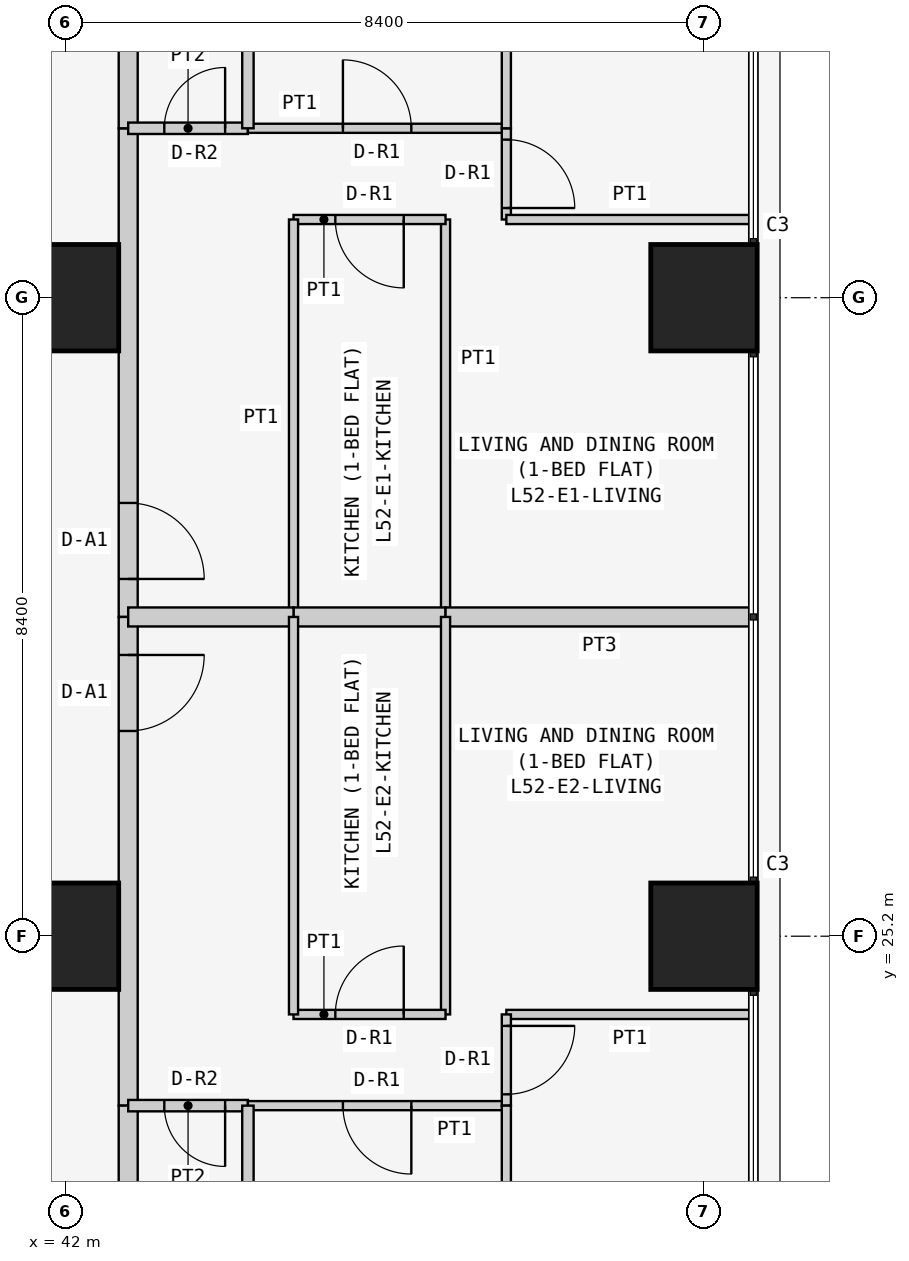
"""IFC4 building model, lengths in metres.
Left out: names, types, materials, properties, quantities, classifications, styles, units other than length and angle.
Written with IfcOpenShell. Run it as: python <this file> out.ifc"""

import sys

from ifc_helpers import new_model, si_unit, direction, frame, frame_2d, origin, origin_2d, place, context, subcontext, project, spatial, rectangle, extrude, element, fill, save


model = new_model("IFC4")
c1 = context("Model", 3, precision=1e-05, world=origin(), true_north=direction((0.0, 1.0)))
c2 = subcontext(c1, "Body", "Model", "MODEL_VIEW")
j1 = project(units=[si_unit("LENGTHUNIT", "METRE"), si_unit("PLANEANGLEUNIT", "RADIAN")], contexts=[c1])
p1 = place(None, origin())
s1 = spatial("IfcSite", under=j1, at=p1, CompositionType="ELEMENT")
p2 = place(p1, origin())
s2 = spatial("IfcBuilding", under=s1, at=p2, CompositionType="ELEMENT")
p3 = place(p2, frame((0.0, 0.0, 201.3)))
s3 = spatial("IfcBuildingStorey", under=s2, at=p3, CompositionType="ELEMENT", Elevation=201.3)
for number, where, z_axis, x_axis in (
    (1, (42.0, 25.2, 0.0), (0.0, 0.0, 1.0), (1.0, 0.0, 0.0)),
    (2, (42.0, 33.6, 0.0), (0.0, 0.0, 1.0), (1.0, 0.0, 0.0)),
    (3, (50.4, 25.2, 0.0), (0.0, 0.0, 1.0), (1.0, 0.0, 0.0)),
    (4, (50.4, 33.6, 0.0), (0.0, 0.0, 1.0), (1.0, 0.0, 0.0)),
):
    element("IfcColumn", number, at=place(p3, frame(where, z_axis=z_axis, x_axis=x_axis)), inside=s3, PredefinedType="COLUMN", context=c2, shape_type="SweptSolid", body=[
        extrude(rectangle(XDim=1.4, YDim=1.4, at=origin_2d()), origin(), (0.0, 0.0, 1.0), 3.6),
    ])
p4 = place(p3, frame((42.825, 35.829, 0.0), z_axis=(0.0, 0.0, 1.0), x_axis=(0.0, -1.0, 0.0)))
e5 = element("IfcWall", 5, at=p4, inside=s3, PredefinedType="PARTITIONING", context=c2, shape_type="SweptSolid", body=[
    extrude(rectangle(XDim=6.429, YDim=0.25, at=frame_2d((3.215, 0.0))), origin(), (0.0, 0.0, 1.0), 3.45),
])
p5 = place(p4, frame((4.929, 0.0, 0.0)))
e6 = element("IfcOpeningElement", 6, at=p5, cuts=e5, PredefinedType="OPENING", context=c2, shape_type="SweptSolid", body=[
    extrude(rectangle(XDim=1.0, YDim=2.1, at=frame_2d((0.5, 1.05))), frame((0.0, 0.135, 0.0), z_axis=(0.0, -1.0, 0.0), x_axis=(1.0, 0.0, 0.0)), (0.0, 0.0, 1.0), 0.27),
])
p6 = place(p3, frame((42.825, 42.7, 0.0), z_axis=(0.0, 0.0, 1.0), x_axis=(0.0, -1.0, 0.0)))
e7 = element("IfcWall", 7, at=p6, inside=s3, PredefinedType="PARTITIONING", context=c2, shape_type="SweptSolid", body=[
    extrude(rectangle(XDim=6.871, YDim=0.25, at=frame_2d((3.436, 0.0))), origin(), (0.0, 0.0, 1.0), 3.45),
])
p7 = place(p3, frame((42.825, 29.4, 0.0), z_axis=(0.0, 0.0, 1.0), x_axis=(0.0, -1.0, 0.0)))
e8 = element("IfcWall", 8, at=p7, inside=s3, PredefinedType="PARTITIONING", context=c2, shape_type="SweptSolid", body=[
    extrude(rectangle(XDim=6.429, YDim=0.25, at=frame_2d((3.214, 0.0))), origin(), (0.0, 0.0, 1.0), 3.45),
])
p8 = place(p7, frame((0.5, 0.0, 0.0)))
e9 = element("IfcOpeningElement", 9, at=p8, cuts=e8, PredefinedType="OPENING", context=c2, shape_type="SweptSolid", body=[
    extrude(rectangle(XDim=1.0, YDim=2.1, at=frame_2d((0.5, 1.05))), frame((0.0, 0.135, 0.0), z_axis=(0.0, -1.0, 0.0), x_axis=(1.0, 0.0, 0.0)), (0.0, 0.0, 1.0), 0.27),
])
p9 = place(p3, frame((42.825, 22.971, 0.0), z_axis=(0.0, 0.0, 1.0), x_axis=(0.0, -1.0, 0.0)))
e10 = element("IfcWall", 10, at=p9, inside=s3, PredefinedType="PARTITIONING", context=c2, shape_type="SweptSolid", body=[
    extrude(rectangle(XDim=6.871, YDim=0.25, at=frame_2d((3.436, 0.0))), origin(), (0.0, 0.0, 1.0), 3.45),
])
p10 = place(p3, frame((47.0, 29.4, 0.0), z_axis=(0.0, 0.0, 1.0), x_axis=(0.0, 1.0, 0.0)))
e11 = element("IfcWall", 11, at=p10, inside=s3, PredefinedType="PARTITIONING", context=c2, shape_type="SweptSolid", body=[
    extrude(rectangle(XDim=5.229, YDim=0.12, at=frame_2d((2.615, 0.0))), origin(), (0.0, 0.0, 1.0), 3.45),
])
p11 = place(p3, frame((47.0, 34.629, 0.0), z_axis=(0.0, 0.0, 1.0), x_axis=(-1.0, 0.0, 0.0)))
e12 = element("IfcWall", 12, at=p11, inside=s3, PredefinedType="PARTITIONING", context=c2, shape_type="SweptSolid", body=[
    extrude(rectangle(XDim=2.0, YDim=0.12, at=frame_2d((1.0, 0.0))), origin(), (0.0, 0.0, 1.0), 3.45),
])
p12 = place(p11, frame((0.55, 0.0, 0.0)))
e13 = element("IfcOpeningElement", 13, at=p12, cuts=e12, PredefinedType="OPENING", context=c2, shape_type="SweptSolid", body=[
    extrude(rectangle(XDim=0.9, YDim=2.1, at=frame_2d((0.45, 1.05))), frame((0.0, 0.07, 0.0), z_axis=(0.0, -1.0, 0.0), x_axis=(1.0, 0.0, 0.0)), (0.0, 0.0, 1.0), 0.14),
])
p13 = place(p3, frame((45.0, 34.629, 0.0), z_axis=(0.0, 0.0, 1.0), x_axis=(0.0, -1.0, 0.0)))
e14 = element("IfcWall", 14, at=p13, inside=s3, PredefinedType="PARTITIONING", context=c2, shape_type="SweptSolid", body=[
    extrude(rectangle(XDim=5.229, YDim=0.12, at=frame_2d((2.615, 0.0))), origin(), (0.0, 0.0, 1.0), 3.45),
])
p14 = place(p3, frame((45.0, 29.4, 0.0), z_axis=(0.0, 0.0, 1.0), x_axis=(1.0, 0.0, 0.0)))
e15 = element("IfcWall", 15, at=p14, inside=s3, PredefinedType="PARTITIONING", context=c2, shape_type="SweptSolid", body=[
    extrude(rectangle(XDim=2.0, YDim=0.25, at=frame_2d((1.0, 0.0))), origin(), (0.0, 0.0, 1.0), 3.45),
])
p15 = place(p3, frame((42.825, 35.829, 0.0), z_axis=(0.0, 0.0, 1.0), x_axis=(1.0, 0.0, 0.0)))
e16 = element("IfcWall", 16, at=p15, inside=s3, PredefinedType="PARTITIONING", context=c2, shape_type="SweptSolid", body=[
    extrude(rectangle(XDim=1.575, YDim=0.15, at=frame_2d((0.788, 0.0))), origin(), (0.0, 0.0, 1.0), 3.45),
])
p16 = place(p15, frame((0.475, 0.0, 0.0)))
e17 = element("IfcOpeningElement", 17, at=p16, cuts=e16, PredefinedType="OPENING", context=c2, shape_type="SweptSolid", body=[
    extrude(rectangle(XDim=0.8, YDim=2.1, at=frame_2d((0.4, 1.05))), frame((0.0, 0.085, 0.0), z_axis=(0.0, -1.0, 0.0), x_axis=(1.0, 0.0, 0.0)), (0.0, 0.0, 1.0), 0.17),
])
p17 = place(p3, frame((44.4, 35.829, 0.0), z_axis=(0.0, 0.0, 1.0), x_axis=(1.0, 0.0, 0.0)))
e18 = element("IfcWall", 18, at=p17, inside=s3, PredefinedType="PARTITIONING", context=c2, shape_type="SweptSolid", body=[
    extrude(rectangle(XDim=3.4, YDim=0.12, at=frame_2d((1.7, 0.0))), origin(), (0.0, 0.0, 1.0), 3.45),
])
p18 = place(p17, frame((1.25, 0.0, 0.0)))
e19 = element("IfcOpeningElement", 19, at=p18, cuts=e18, PredefinedType="OPENING", context=c2, shape_type="SweptSolid", body=[
    extrude(rectangle(XDim=0.9, YDim=2.1, at=frame_2d((0.45, 1.05))), frame((0.0, 0.07, 0.0), z_axis=(0.0, -1.0, 0.0), x_axis=(1.0, 0.0, 0.0)), (0.0, 0.0, 1.0), 0.14),
])
p19 = place(p3, frame((47.8, 35.829, 0.0), z_axis=(0.0, 0.0, 1.0), x_axis=(0.0, -1.0, 0.0)))
e20 = element("IfcWall", 20, at=p19, inside=s3, PredefinedType="PARTITIONING", context=c2, shape_type="SweptSolid", body=[
    extrude(rectangle(XDim=1.2, YDim=0.12, at=frame_2d((0.6, 0.0))), origin(), (0.0, 0.0, 1.0), 3.45),
])
p20 = place(p19, frame((0.149, 0.0, 0.0)))
e21 = element("IfcOpeningElement", 21, at=p20, cuts=e20, PredefinedType="OPENING", context=c2, shape_type="SweptSolid", body=[
    extrude(rectangle(XDim=0.9, YDim=2.1, at=frame_2d((0.45, 1.05))), frame((0.0, 0.07, 0.0), z_axis=(0.0, -1.0, 0.0), x_axis=(1.0, 0.0, 0.0)), (0.0, 0.0, 1.0), 0.14),
])
p21 = place(p3, frame((47.8, 34.629, 0.0), z_axis=(0.0, 0.0, 1.0), x_axis=(1.0, 0.0, 0.0)))
e22 = element("IfcWall", 22, at=p21, inside=s3, PredefinedType="PARTITIONING", context=c2, shape_type="SweptSolid", body=[
    extrude(rectangle(XDim=3.25, YDim=0.12, at=frame_2d((1.625, 0.0))), origin(), (0.0, 0.0, 1.0), 3.45),
])
p22 = place(p3, frame((45.0, 29.4, 0.0), z_axis=(0.0, 0.0, 1.0), x_axis=(-1.0, 0.0, 0.0)))
e23 = element("IfcWall", 23, at=p22, inside=s3, PredefinedType="PARTITIONING", context=c2, shape_type="SweptSolid", body=[
    extrude(rectangle(XDim=2.175, YDim=0.25, at=frame_2d((1.087, 0.0))), origin(), (0.0, 0.0, 1.0), 3.45),
])
p23 = place(p3, frame((51.05, 29.4, 0.0), z_axis=(0.0, 0.0, 1.0), x_axis=(-1.0, 0.0, 0.0)))
e24 = element("IfcWall", 24, at=p23, inside=s3, PredefinedType="PARTITIONING", context=c2, shape_type="SweptSolid", body=[
    extrude(rectangle(XDim=4.05, YDim=0.25, at=frame_2d((2.025, 0.0))), origin(), (0.0, 0.0, 1.0), 3.45),
])
p24 = place(p3, frame((44.4, 35.829, 0.0), z_axis=(0.0, 0.0, 1.0), x_axis=(0.0, 1.0, 0.0)))
e25 = element("IfcWall", 25, at=p24, inside=s3, PredefinedType="PARTITIONING", context=c2, shape_type="SweptSolid", body=[
    extrude(rectangle(XDim=6.871, YDim=0.15, at=frame_2d((3.436, 0.0))), origin(), (0.0, 0.0, 1.0), 3.45),
])
p25 = place(p3, frame((47.8, 35.829, 0.0), z_axis=(0.0, 0.0, 1.0), x_axis=(0.0, 1.0, 0.0)))
e26 = element("IfcWall", 26, at=p25, inside=s3, PredefinedType="PARTITIONING", context=c2, shape_type="SweptSolid", body=[
    extrude(rectangle(XDim=6.871, YDim=0.12, at=frame_2d((3.436, 0.0))), origin(), (0.0, 0.0, 1.0), 3.45),
])
p26 = place(p3, frame((47.0, 29.4, 0.0), z_axis=(0.0, 0.0, 1.0), x_axis=(0.0, -1.0, 0.0)))
e27 = element("IfcWall", 27, at=p26, inside=s3, PredefinedType="PARTITIONING", context=c2, shape_type="SweptSolid", body=[
    extrude(rectangle(XDim=5.229, YDim=0.12, at=frame_2d((2.615, 0.0))), origin(), (0.0, 0.0, 1.0), 3.45),
])
p27 = place(p3, frame((47.0, 24.171, 0.0), z_axis=(0.0, 0.0, 1.0), x_axis=(-1.0, 0.0, 0.0)))
e28 = element("IfcWall", 28, at=p27, inside=s3, PredefinedType="PARTITIONING", context=c2, shape_type="SweptSolid", body=[
    extrude(rectangle(XDim=2.0, YDim=0.12, at=frame_2d((1.0, 0.0))), origin(), (0.0, 0.0, 1.0), 3.45),
])
p28 = place(p27, frame((0.55, 0.0, 0.0)))
e29 = element("IfcOpeningElement", 29, at=p28, cuts=e28, PredefinedType="OPENING", context=c2, shape_type="SweptSolid", body=[
    extrude(rectangle(XDim=0.9, YDim=2.1, at=frame_2d((0.45, 1.05))), frame((0.0, 0.07, 0.0), z_axis=(0.0, -1.0, 0.0), x_axis=(1.0, 0.0, 0.0)), (0.0, 0.0, 1.0), 0.14),
])
p29 = place(p3, frame((45.0, 24.171, 0.0), z_axis=(0.0, 0.0, 1.0), x_axis=(0.0, 1.0, 0.0)))
e30 = element("IfcWall", 30, at=p29, inside=s3, PredefinedType="PARTITIONING", context=c2, shape_type="SweptSolid", body=[
    extrude(rectangle(XDim=5.229, YDim=0.12, at=frame_2d((2.615, 0.0))), origin(), (0.0, 0.0, 1.0), 3.45),
])
p30 = place(p3, frame((44.4, 22.971, 0.0), z_axis=(0.0, 0.0, 1.0), x_axis=(-1.0, 0.0, 0.0)))
e31 = element("IfcWall", 31, at=p30, inside=s3, PredefinedType="PARTITIONING", context=c2, shape_type="SweptSolid", body=[
    extrude(rectangle(XDim=1.575, YDim=0.15, at=frame_2d((0.788, 0.0))), origin(), (0.0, 0.0, 1.0), 3.45),
])
p31 = place(p30, frame((0.3, 0.0, 0.0)))
e32 = element("IfcOpeningElement", 32, at=p31, cuts=e31, PredefinedType="OPENING", context=c2, shape_type="SweptSolid", body=[
    extrude(rectangle(XDim=0.8, YDim=2.1, at=frame_2d((0.4, 1.05))), frame((0.0, 0.085, 0.0), z_axis=(0.0, -1.0, 0.0), x_axis=(1.0, 0.0, 0.0)), (0.0, 0.0, 1.0), 0.17),
])
p32 = place(p3, frame((47.8, 22.971, 0.0), z_axis=(0.0, 0.0, 1.0), x_axis=(-1.0, 0.0, 0.0)))
e33 = element("IfcWall", 33, at=p32, inside=s3, PredefinedType="PARTITIONING", context=c2, shape_type="SweptSolid", body=[
    extrude(rectangle(XDim=3.4, YDim=0.12, at=frame_2d((1.7, 0.0))), origin(), (0.0, 0.0, 1.0), 3.45),
])
p33 = place(p32, frame((1.25, 0.0, 0.0)))
e34 = element("IfcOpeningElement", 34, at=p33, cuts=e33, PredefinedType="OPENING", context=c2, shape_type="SweptSolid", body=[
    extrude(rectangle(XDim=0.9, YDim=2.1, at=frame_2d((0.45, 1.05))), frame((0.0, 0.07, 0.0), z_axis=(0.0, -1.0, 0.0), x_axis=(1.0, 0.0, 0.0)), (0.0, 0.0, 1.0), 0.14),
])
p34 = place(p3, frame((51.05, 24.171, 0.0), z_axis=(0.0, 0.0, 1.0), x_axis=(-1.0, 0.0, 0.0)))
e35 = element("IfcWall", 35, at=p34, inside=s3, PredefinedType="PARTITIONING", context=c2, shape_type="SweptSolid", body=[
    extrude(rectangle(XDim=3.25, YDim=0.12, at=frame_2d((1.625, 0.0))), origin(), (0.0, 0.0, 1.0), 3.45),
])
p35 = place(p3, frame((47.8, 24.171, 0.0), z_axis=(0.0, 0.0, 1.0), x_axis=(0.0, -1.0, 0.0)))
e36 = element("IfcWall", 36, at=p35, inside=s3, PredefinedType="PARTITIONING", context=c2, shape_type="SweptSolid", body=[
    extrude(rectangle(XDim=1.2, YDim=0.12, at=frame_2d((0.6, 0.0))), origin(), (0.0, 0.0, 1.0), 3.45),
])
p36 = place(p35, frame((0.151, 0.0, 0.0)))
e37 = element("IfcOpeningElement", 37, at=p36, cuts=e36, PredefinedType="OPENING", context=c2, shape_type="SweptSolid", body=[
    extrude(rectangle(XDim=0.9, YDim=2.1, at=frame_2d((0.45, 1.05))), frame((0.0, 0.07, 0.0), z_axis=(0.0, -1.0, 0.0), x_axis=(1.0, 0.0, 0.0)), (0.0, 0.0, 1.0), 0.14),
])
p37 = place(p3, frame((44.4, 22.971, 0.0), z_axis=(0.0, 0.0, 1.0), x_axis=(0.0, -1.0, 0.0)))
e38 = element("IfcWall", 38, at=p37, inside=s3, PredefinedType="PARTITIONING", context=c2, shape_type="SweptSolid", body=[
    extrude(rectangle(XDim=6.871, YDim=0.15, at=frame_2d((3.436, 0.0))), origin(), (0.0, 0.0, 1.0), 3.45),
])
p38 = place(p3, frame((47.8, 22.971, 0.0), z_axis=(0.0, 0.0, 1.0), x_axis=(0.0, -1.0, 0.0)))
e39 = element("IfcWall", 39, at=p38, inside=s3, PredefinedType="PARTITIONING", context=c2, shape_type="SweptSolid", body=[
    extrude(rectangle(XDim=6.871, YDim=0.12, at=frame_2d((3.436, 0.0))), origin(), (0.0, 0.0, 1.0), 3.45),
])
p39 = place(p5, origin())
e40 = element("IfcDoor", 40, at=p39, inside=s3, OperationType="SINGLE_SWING_RIGHT", PredefinedType="DOOR", context=c2, shape_type="SweptSolid", body=[
    extrude(rectangle(XDim=1.0, YDim=2.1, at=frame_2d((0.5, 1.05))), frame((0.0, 0.025, 0.0), z_axis=(0.0, -1.0, 0.0), x_axis=(1.0, 0.0, 0.0)), (0.0, 0.0, 1.0), 0.05),
])
fill(e6, e40)
p40 = place(p12, origin())
e41 = element("IfcDoor", 41, at=p40, inside=s3, OperationType="SINGLE_SWING_LEFT", PredefinedType="DOOR", context=c2, shape_type="SweptSolid", body=[
    extrude(rectangle(XDim=0.9, YDim=2.1, at=frame_2d((0.45, 1.05))), frame((0.0, 0.025, 0.0), z_axis=(0.0, -1.0, 0.0), x_axis=(1.0, 0.0, 0.0)), (0.0, 0.0, 1.0), 0.05),
])
fill(e13, e41)
p41 = place(p16, origin())
e42 = element("IfcDoor", 42, at=p41, inside=s3, OperationType="SINGLE_SWING_RIGHT", PredefinedType="DOOR", context=c2, shape_type="SweptSolid", body=[
    extrude(rectangle(XDim=0.8, YDim=2.1, at=frame_2d((0.4, 1.05))), frame((0.0, 0.025, 0.0), z_axis=(0.0, -1.0, 0.0), x_axis=(1.0, 0.0, 0.0)), (0.0, 0.0, 1.0), 0.05),
])
fill(e17, e42)
p42 = place(p18, origin())
e43 = element("IfcDoor", 43, at=p42, inside=s3, OperationType="SINGLE_SWING_LEFT", PredefinedType="DOOR", context=c2, shape_type="SweptSolid", body=[
    extrude(rectangle(XDim=0.9, YDim=2.1, at=frame_2d((0.45, 1.05))), frame((0.0, 0.025, 0.0), z_axis=(0.0, -1.0, 0.0), x_axis=(1.0, 0.0, 0.0)), (0.0, 0.0, 1.0), 0.05),
])
fill(e19, e43)
p43 = place(p20, origin())
e44 = element("IfcDoor", 44, at=p43, inside=s3, OperationType="SINGLE_SWING_RIGHT", PredefinedType="DOOR", context=c2, shape_type="SweptSolid", body=[
    extrude(rectangle(XDim=0.9, YDim=2.1, at=frame_2d((0.45, 1.05))), frame((0.0, 0.025, 0.0), z_axis=(0.0, -1.0, 0.0), x_axis=(1.0, 0.0, 0.0)), (0.0, 0.0, 1.0), 0.05),
])
fill(e21, e44)
p44 = place(p8, origin())
e45 = element("IfcDoor", 45, at=p44, inside=s3, OperationType="SINGLE_SWING_LEFT", PredefinedType="DOOR", context=c2, shape_type="SweptSolid", body=[
    extrude(rectangle(XDim=1.0, YDim=2.1, at=frame_2d((0.5, 1.05))), frame((0.0, 0.025, 0.0), z_axis=(0.0, -1.0, 0.0), x_axis=(1.0, 0.0, 0.0)), (0.0, 0.0, 1.0), 0.05),
])
fill(e9, e45)
p45 = place(p28, frame((0.9, 0.0, 0.0), z_axis=(0.0, 0.0, 1.0), x_axis=(-1.0, 0.0, 0.0)))
e46 = element("IfcDoor", 46, at=p45, inside=s3, OperationType="SINGLE_SWING_RIGHT", PredefinedType="DOOR", context=c2, shape_type="SweptSolid", body=[
    extrude(rectangle(XDim=0.9, YDim=2.1, at=frame_2d((0.45, 1.05))), frame((0.0, 0.025, 0.0), z_axis=(0.0, -1.0, 0.0), x_axis=(1.0, 0.0, 0.0)), (0.0, 0.0, 1.0), 0.05),
])
fill(e29, e46)
p46 = place(p31, origin())
e47 = element("IfcDoor", 47, at=p46, inside=s3, OperationType="SINGLE_SWING_LEFT", PredefinedType="DOOR", context=c2, shape_type="SweptSolid", body=[
    extrude(rectangle(XDim=0.8, YDim=2.1, at=frame_2d((0.4, 1.05))), frame((0.0, 0.025, 0.0), z_axis=(0.0, -1.0, 0.0), x_axis=(1.0, 0.0, 0.0)), (0.0, 0.0, 1.0), 0.05),
])
fill(e32, e47)
p47 = place(p33, origin())
e48 = element("IfcDoor", 48, at=p47, inside=s3, OperationType="SINGLE_SWING_LEFT", PredefinedType="DOOR", context=c2, shape_type="SweptSolid", body=[
    extrude(rectangle(XDim=0.9, YDim=2.1, at=frame_2d((0.45, 1.05))), frame((0.0, 0.025, 0.0), z_axis=(0.0, -1.0, 0.0), x_axis=(1.0, 0.0, 0.0)), (0.0, 0.0, 1.0), 0.05),
])
fill(e34, e48)
p48 = place(p36, origin())
e49 = element("IfcDoor", 49, at=p48, inside=s3, OperationType="SINGLE_SWING_LEFT", PredefinedType="DOOR", context=c2, shape_type="SweptSolid", body=[
    extrude(rectangle(XDim=0.9, YDim=2.1, at=frame_2d((0.45, 1.05))), frame((0.0, 0.025, 0.0), z_axis=(0.0, -1.0, 0.0), x_axis=(1.0, 0.0, 0.0)), (0.0, 0.0, 1.0), 0.05),
])
fill(e37, e49)
save(model, sys.argv[1])
